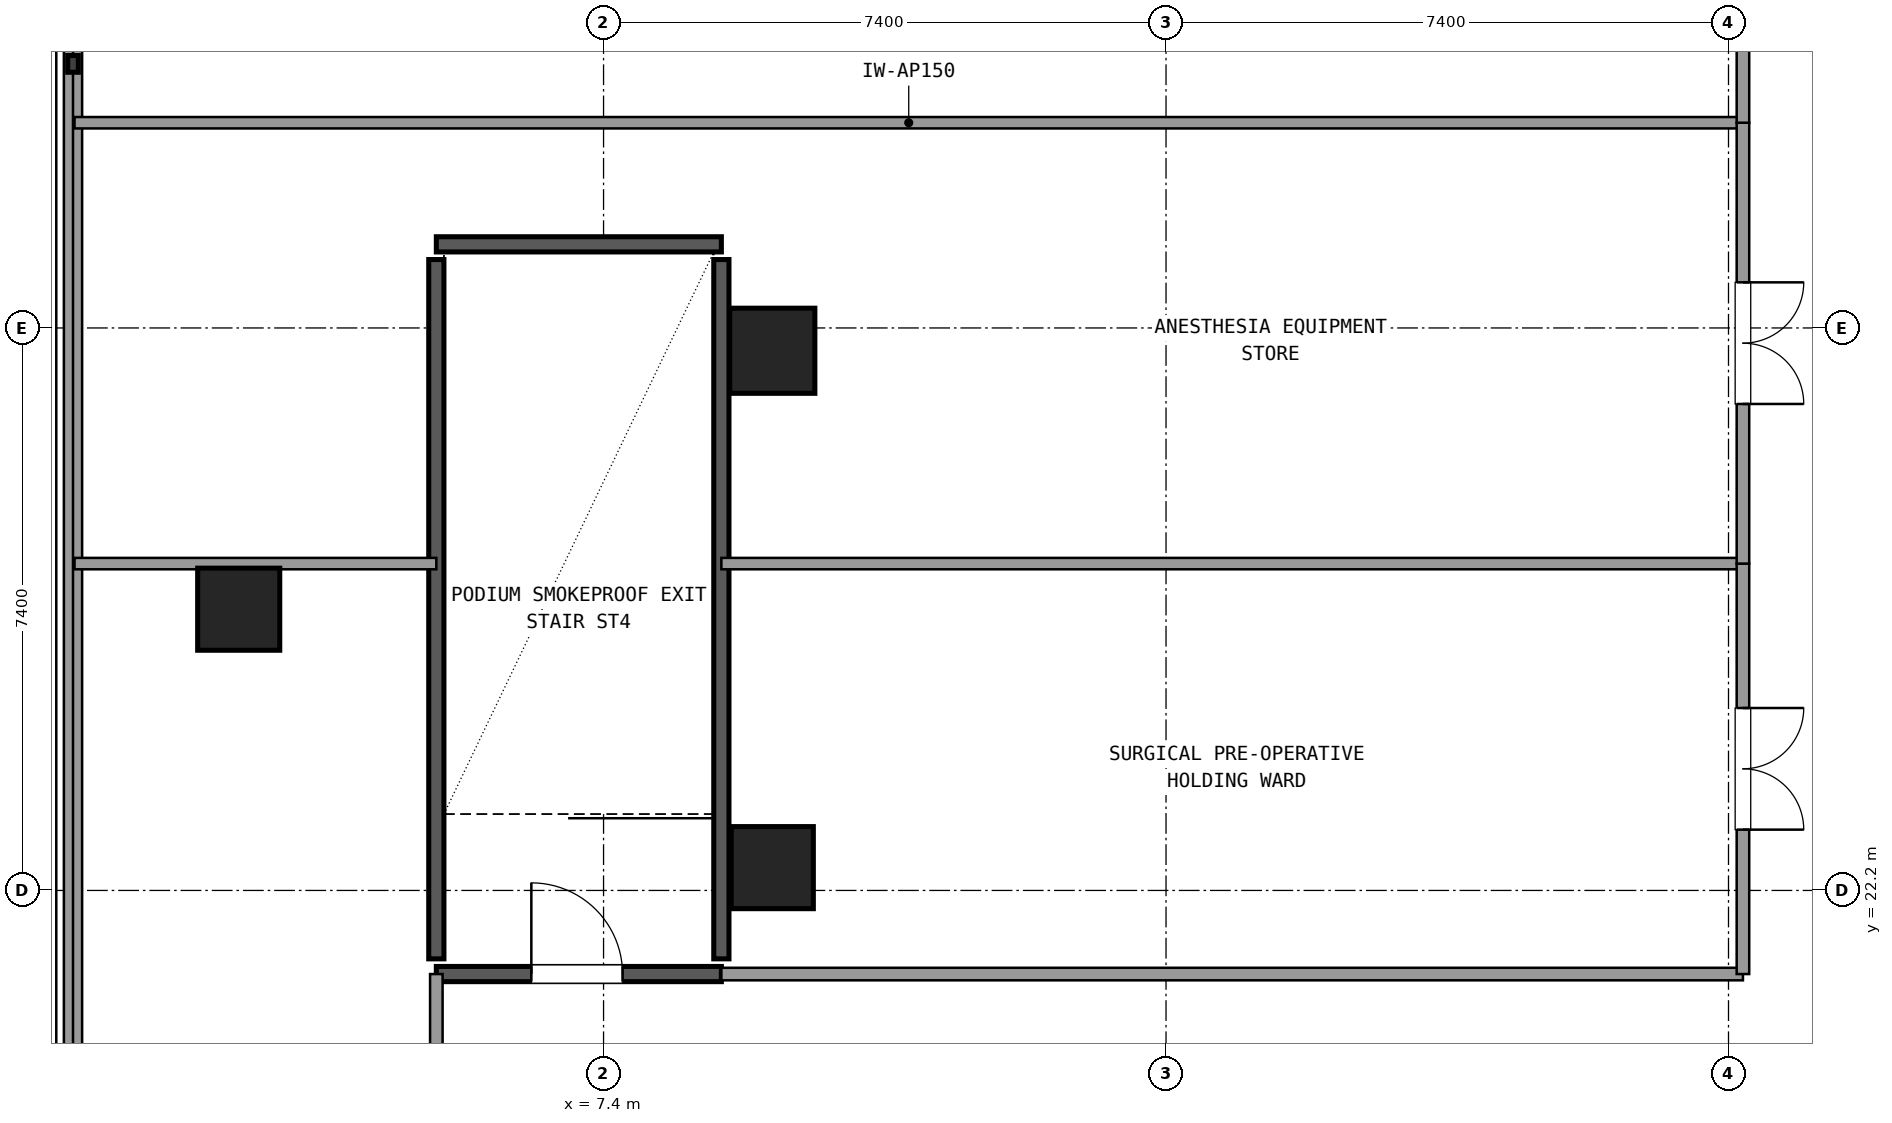
"""IFC4 building model, lengths in metres.
Left out: names, types, materials, properties, quantities, classifications, styles, units other than length and angle.
Written with IfcOpenShell. Run it as: python <this file> out.ifc"""

import sys

from ifc_helpers import new_model, si_unit, direction, frame, frame_2d, origin, origin_2d, place, context, subcontext, project, spatial, rectangle, circle, extrude, element, fill, save


model = new_model("IFC4")
c1 = context("Model", 3, precision=1e-05, world=origin(), true_north=direction((0.0, 1.0)))
c2 = subcontext(c1, "Body", "Model", "MODEL_VIEW")
j1 = project(units=[si_unit("LENGTHUNIT", "METRE"), si_unit("PLANEANGLEUNIT", "RADIAN")], contexts=[c1])
p1 = place(None, origin())
s1 = spatial("IfcSite", under=j1, at=p1, CompositionType="ELEMENT")
p2 = place(p1, origin())
s2 = spatial("IfcBuilding", under=s1, at=p2, CompositionType="ELEMENT")
p3 = place(p2, frame((0.0, 0.0, 18.9)))
s3 = spatial("IfcBuildingStorey", under=s2, at=p3, CompositionType="ELEMENT", Elevation=18.9)
p4 = place(p3, frame((9.62, 22.5, 0.0), z_axis=(0.0, 0.0, 1.0), x_axis=(1.0, 0.0, 0.0)))
e1 = element("IfcColumn", 1, at=p4, inside=s3, PredefinedType="COLUMN", context=c2, shape_type="SweptSolid", body=[
    extrude(rectangle(XDim=1.08, YDim=1.08, at=origin_2d()), origin(), (0.0, 0.0, 1.0), 5.04),
])
p5 = place(p3, frame((9.62, 29.3, 0.0), z_axis=(0.0, 0.0, 1.0), x_axis=(1.0, 0.0, 0.0)))
e2 = element("IfcColumn", 2, at=p5, inside=s3, PredefinedType="COLUMN", context=c2, shape_type="SweptSolid", body=[
    extrude(circle(Radius=0.56, at=origin_2d()), origin(), (0.0, 0.0, 1.0), 5.04),
])
p6 = place(p3, frame((2.6, 25.9, 0.0), z_axis=(0.0, 0.0, 1.0), x_axis=(1.0, 0.0, 0.0)))
e3 = element("IfcColumn", 3, at=p6, inside=s3, PredefinedType="COLUMN", context=c2, shape_type="SweptSolid", body=[
    extrude(rectangle(XDim=1.08, YDim=1.08, at=origin_2d()), origin(), (0.0, 0.0, 1.0), 5.04),
])
p7 = place(p3, frame((0.42, 47.421, 0.0), z_axis=(0.0, 0.0, 1.0), x_axis=(0.0, -1.0, 0.0)))
e4 = element("IfcWall", 4, at=p7, inside=s3, PredefinedType="SOLIDWALL", context=c2, shape_type="SweptSolid", body=[
    extrude(rectangle(XDim=43.042, YDim=0.24, at=frame_2d((21.521, 0.0))), origin(), (0.0, 0.0, 1.0), 0.85),
])
p8 = place(p3, frame((5.2, 21.1, 0.0), z_axis=(0.0, 0.0, 1.0), x_axis=(1.0, 0.0, 0.0)))
e5 = element("IfcWall", 5, at=p8, inside=s3, PredefinedType="SHEAR", context=c2, shape_type="SweptSolid", body=[
    extrude(rectangle(XDim=3.75, YDim=0.2, at=frame_2d((1.875, 0.0))), origin(), (0.0, 0.0, 1.0), 4.76),
])
p9 = place(p8, frame((1.25, 0.0, 0.0)))
e6 = element("IfcOpeningElement", 6, at=p9, cuts=e5, PredefinedType="OPENING", context=c2, shape_type="SweptSolid", body=[
    extrude(rectangle(XDim=1.2, YDim=2.15, at=frame_2d((0.6, 1.075))), frame((0.0, 0.11, 0.0), z_axis=(0.0, -1.0, 0.0), x_axis=(1.0, 0.0, 0.0)), (0.0, 0.0, 1.0), 0.22),
])
p10 = place(p3, frame((5.2, 30.7, 0.0), z_axis=(0.0, 0.0, 1.0), x_axis=(1.0, 0.0, 0.0)))
e7 = element("IfcWall", 7, at=p10, inside=s3, PredefinedType="SHEAR", context=c2, shape_type="SweptSolid", body=[
    extrude(rectangle(XDim=3.75, YDim=0.2, at=frame_2d((1.875, 0.0))), origin(), (0.0, 0.0, 1.0), 4.76),
])
for number, where, z_axis, x_axis in (
    (8, (5.2, 21.3, 0.0), (0.0, 0.0, 1.0), (0.0, 1.0, 0.0)),
    (9, (8.95, 21.3, 0.0), (0.0, 0.0, 1.0), (0.0, 1.0, 0.0)),
):
    element("IfcWall", number, at=place(p3, frame(where, z_axis=z_axis, x_axis=x_axis)), inside=s3, PredefinedType="SHEAR", context=c2, shape_type="SweptSolid", body=[
        extrude(rectangle(XDim=9.2, YDim=0.2, at=frame_2d((4.6, 0.0))), origin(), (0.0, 0.0, 1.0), 4.76),
    ])
p11 = place(p3, frame((5.2, 18.17, 0.0), z_axis=(0.0, 0.0, 1.0), x_axis=(0.0, 1.0, 0.0)))
e10 = element("IfcWall", 10, at=p11, inside=s3, PredefinedType="PARTITIONING", context=c2, shape_type="SweptSolid", body=[
    extrude(rectangle(XDim=2.93, YDim=0.165, at=frame_2d((1.465, 0.0))), origin(), (0.0, 0.0, 1.0), 3.13),
])
p12 = place(p3, frame((8.95, 21.1, 0.0), z_axis=(0.0, 0.0, 1.0), x_axis=(1.0, 0.0, 0.0)))
e11 = element("IfcWall", 11, at=p12, inside=s3, PredefinedType="PARTITIONING", context=c2, shape_type="SweptSolid", body=[
    extrude(rectangle(XDim=13.44, YDim=0.165, at=frame_2d((6.72, 0.0))), origin(), (0.0, 0.0, 1.0), 3.13),
])
p13 = place(p3, frame((8.95, 26.5, 0.0), z_axis=(0.0, 0.0, 1.0), x_axis=(1.0, 0.0, 0.0)))
e12 = element("IfcWall", 12, at=p13, inside=s3, PredefinedType="PARTITIONING", context=c2, shape_type="SweptSolid", body=[
    extrude(rectangle(XDim=13.44, YDim=0.15, at=frame_2d((6.72, 0.0))), origin(), (0.0, 0.0, 1.0), 3.13),
])
p14 = place(p3, frame((5.2, 26.5, 0.0), z_axis=(0.0, 0.0, 1.0), x_axis=(-1.0, 0.0, 0.0)))
e13 = element("IfcWall", 13, at=p14, inside=s3, PredefinedType="PARTITIONING", context=c2, shape_type="SweptSolid", body=[
    extrude(rectangle(XDim=4.76, YDim=0.15, at=frame_2d((2.38, 0.0))), origin(), (0.0, 0.0, 1.0), 3.13),
])
p15 = place(p3, frame((22.39, 32.3, 0.0), z_axis=(0.0, 0.0, 1.0), x_axis=(-1.0, 0.0, 0.0)))
e14 = element("IfcWall", 14, at=p15, inside=s3, PredefinedType="PARTITIONING", context=c2, shape_type="SweptSolid", body=[
    extrude(rectangle(XDim=21.95, YDim=0.15, at=frame_2d((10.975, 0.0))), origin(), (0.0, 0.0, 1.0), 3.13),
])
p16 = place(p3, frame((22.39, 21.1, 0.0), z_axis=(0.0, 0.0, 1.0), x_axis=(0.0, 1.0, 0.0)))
e15 = element("IfcWall", 15, at=p16, inside=s3, PredefinedType="PARTITIONING", context=c2, shape_type="SweptSolid", body=[
    extrude(rectangle(XDim=5.4, YDim=0.165, at=frame_2d((2.7, 0.0))), origin(), (0.0, 0.0, 1.0), 3.13),
])
p17 = place(p16, frame((1.9, 0.0, 0.0)))
e16 = element("IfcOpeningElement", 16, at=p17, cuts=e15, PredefinedType="OPENING", context=c2, shape_type="SweptSolid", body=[
    extrude(rectangle(XDim=1.6, YDim=2.2, at=frame_2d((0.8, 1.1))), frame((0.0, 0.093, 0.0), z_axis=(0.0, -1.0, 0.0), x_axis=(1.0, 0.0, 0.0)), (0.0, 0.0, 1.0), 0.185),
])
p18 = place(p3, frame((22.39, 26.5, 0.0), z_axis=(0.0, 0.0, 1.0), x_axis=(0.0, 1.0, 0.0)))
e17 = element("IfcWall", 17, at=p18, inside=s3, PredefinedType="PARTITIONING", context=c2, shape_type="SweptSolid", body=[
    extrude(rectangle(XDim=5.8, YDim=0.165, at=frame_2d((2.9, 0.0))), origin(), (0.0, 0.0, 1.0), 3.13),
])
p19 = place(p18, frame((2.1, 0.0, 0.0)))
e18 = element("IfcOpeningElement", 18, at=p19, cuts=e17, PredefinedType="OPENING", context=c2, shape_type="SweptSolid", body=[
    extrude(rectangle(XDim=1.6, YDim=2.2, at=frame_2d((0.8, 1.1))), frame((0.0, 0.093, 0.0), z_axis=(0.0, -1.0, 0.0), x_axis=(1.0, 0.0, 0.0)), (0.0, 0.0, 1.0), 0.185),
])
p20 = place(p3, frame((22.39, 32.3, 0.0), z_axis=(0.0, 0.0, 1.0), x_axis=(0.0, 1.0, 0.0)))
e19 = element("IfcWall", 19, at=p20, inside=s3, PredefinedType="PARTITIONING", context=c2, shape_type="SweptSolid", body=[
    extrude(rectangle(XDim=5.61, YDim=0.165, at=frame_2d((2.805, 0.0))), origin(), (0.0, 0.0, 1.0), 3.13),
])
p21 = place(p20, frame((2.005, 0.0, 0.0)))
e20 = element("IfcOpeningElement", 20, at=p21, cuts=e19, PredefinedType="OPENING", context=c2, shape_type="SweptSolid", body=[
    extrude(rectangle(XDim=1.6, YDim=2.2, at=frame_2d((0.8, 1.1))), frame((0.0, 0.093, 0.0), z_axis=(0.0, -1.0, 0.0), x_axis=(1.0, 0.0, 0.0)), (0.0, 0.0, 1.0), 0.185),
])
p22 = place(p9, origin())
e21 = element("IfcDoor", 21, at=p22, inside=s3, OperationType="SINGLE_SWING_LEFT", PredefinedType="DOOR", context=c2, shape_type="SweptSolid", body=[
    extrude(rectangle(XDim=1.2, YDim=2.15, at=frame_2d((0.6, 1.075))), frame((0.0, 0.025, 0.0), z_axis=(0.0, -1.0, 0.0), x_axis=(1.0, 0.0, 0.0)), (0.0, 0.0, 1.0), 0.05),
])
fill(e6, e21)
p23 = place(p17, frame((1.6, 0.0, 0.0), z_axis=(0.0, 0.0, 1.0), x_axis=(-1.0, 0.0, 0.0)))
e22 = element("IfcDoor", 22, at=p23, inside=s3, OperationType="DOUBLE_DOOR_SINGLE_SWING", PredefinedType="DOOR", context=c2, shape_type="SweptSolid", body=[
    extrude(rectangle(XDim=1.6, YDim=2.2, at=frame_2d((0.8, 1.1))), frame((0.0, 0.025, 0.0), z_axis=(0.0, -1.0, 0.0), x_axis=(1.0, 0.0, 0.0)), (0.0, 0.0, 1.0), 0.05),
])
fill(e16, e22)
p24 = place(p19, frame((1.6, 0.0, 0.0), z_axis=(0.0, 0.0, 1.0), x_axis=(-1.0, 0.0, 0.0)))
e23 = element("IfcDoor", 23, at=p24, inside=s3, OperationType="DOUBLE_DOOR_SINGLE_SWING", PredefinedType="DOOR", context=c2, shape_type="SweptSolid", body=[
    extrude(rectangle(XDim=1.6, YDim=2.2, at=frame_2d((0.8, 1.1))), frame((0.0, 0.025, 0.0), z_axis=(0.0, -1.0, 0.0), x_axis=(1.0, 0.0, 0.0)), (0.0, 0.0, 1.0), 0.05),
])
fill(e18, e23)
save(model, sys.argv[1])
